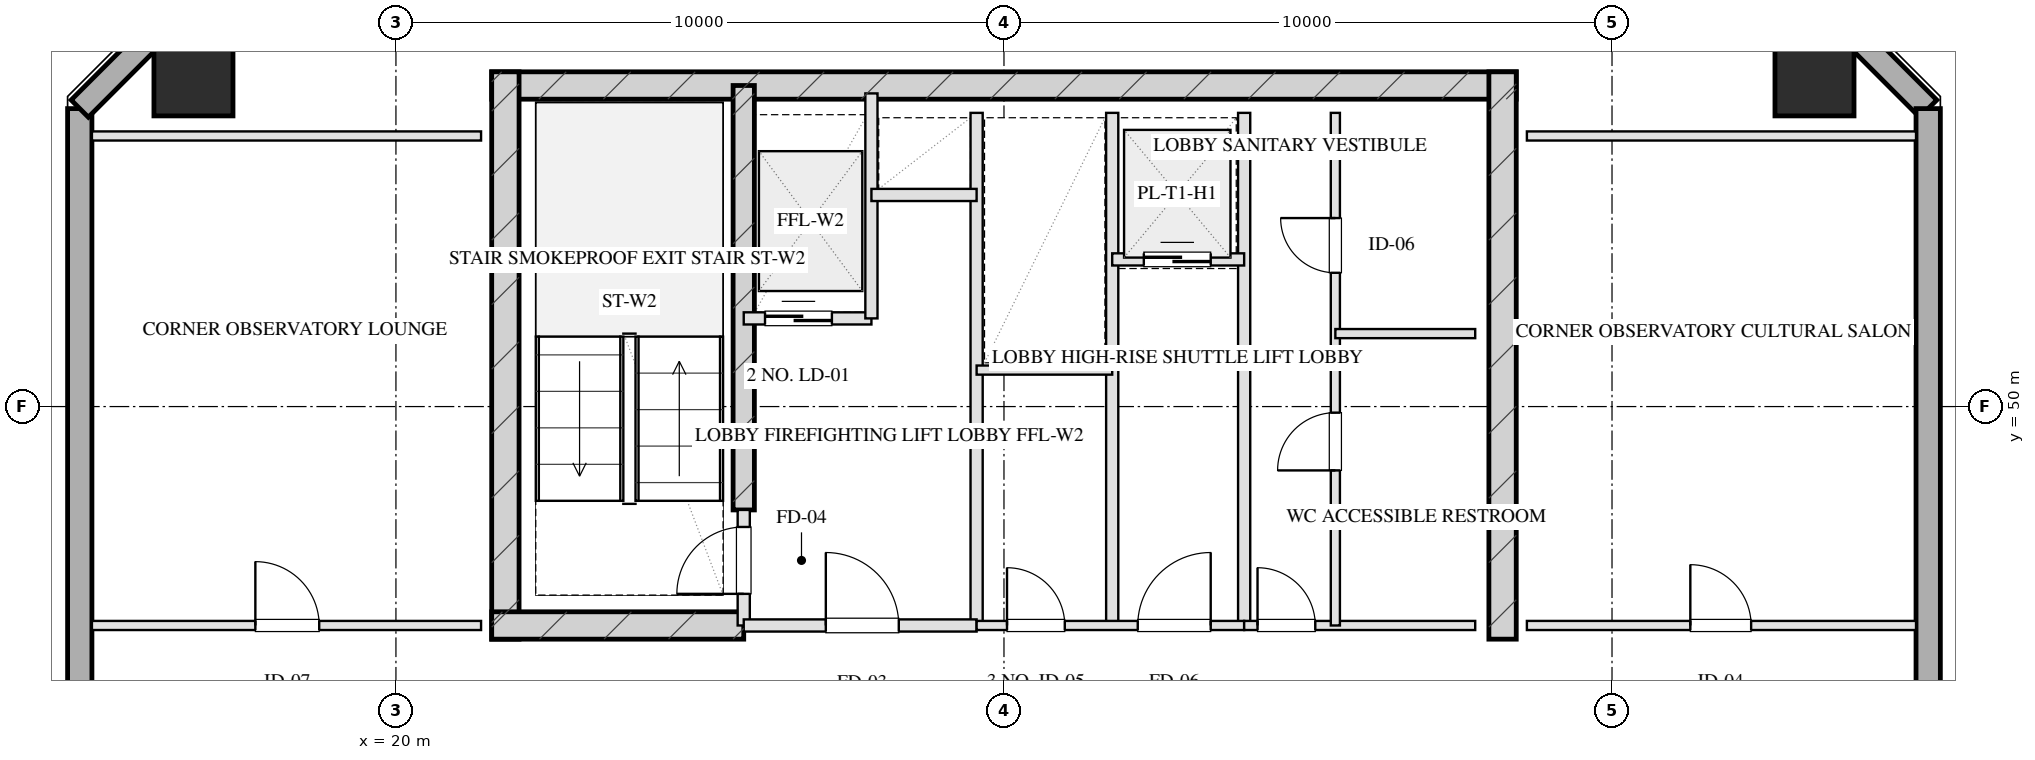
"""IFC4 building model, lengths in metres.
Left out: names, types, materials, properties, quantities, classifications, styles, units other than length and angle.
Written with IfcOpenShell. Run it as: python <this file> out.ifc"""

import sys

from ifc_helpers import new_model, si_unit, direction, frame, frame_2d, origin, origin_2d, place, context, subcontext, project, spatial, rectangle, hollow_rectangle, extrude, element, fill, save


model = new_model("IFC4")
c1 = context("Model", 3, precision=1e-05, world=origin(), true_north=direction((0.0, 1.0)))
c2 = subcontext(c1, "Body", "Model", "MODEL_VIEW")
j1 = project(units=[si_unit("LENGTHUNIT", "METRE"), si_unit("PLANEANGLEUNIT", "RADIAN")], contexts=[c1])
p1 = place(None, origin())
s1 = spatial("IfcSite", under=j1, at=p1, CompositionType="ELEMENT")
p2 = place(p1, origin())
s2 = spatial("IfcBuilding", under=s1, at=p2, CompositionType="ELEMENT")
p3 = place(p2, frame((0.0, 0.0, 266.4)))
s3 = spatial("IfcBuildingStorey", under=s2, at=p3, CompositionType="ELEMENT", Elevation=266.4)
p4 = place(p3, frame((21.575, 55.28, 0.0), z_axis=(0.0, 0.0, 1.0), x_axis=(1.0, 0.0, 0.0)))
e1 = element("IfcWall", 1, at=p4, inside=s3, PredefinedType="SHEAR", context=c2, shape_type="SweptSolid", body=[
    extrude(rectangle(XDim=16.85, YDim=0.45, at=frame_2d((8.425, 0.0))), origin(), (0.0, 0.0, 1.0), 3.2),
])
for number, where, z_axis, x_axis in (
    (2, (21.8, 46.175, 0.0), (0.0, 0.0, 1.0), (0.0, 1.0, 0.0)),
    (3, (38.2, 46.175, 0.0), (0.0, 0.0, 1.0), (0.0, 1.0, 0.0)),
):
    element("IfcWall", number, at=place(p3, frame(where, z_axis=z_axis, x_axis=x_axis)), inside=s3, PredefinedType="SHEAR", context=c2, shape_type="SweptSolid", body=[
        extrude(rectangle(XDim=9.33, YDim=0.45, at=frame_2d((4.665, 0.0))), origin(), (0.0, 0.0, 1.0), 3.2),
    ])
p5 = place(p3, frame((25.72, 48.3, 0.0), z_axis=(0.0, 0.0, 1.0), x_axis=(0.0, 1.0, 0.0)))
e4 = element("IfcWall", 4, at=p5, inside=s3, PredefinedType="SHEAR", context=c2, shape_type="SweptSolid", body=[
    extrude(rectangle(XDim=6.98, YDim=0.35, at=frame_2d((3.49, 0.0))), origin(), (0.0, 0.0, 1.0), 3.2),
])
p6 = place(p3, frame((21.575, 46.4, 0.0), z_axis=(0.0, 0.0, 1.0), x_axis=(1.0, 0.0, 0.0)))
e5 = element("IfcWall", 5, at=p6, inside=s3, PredefinedType="SHEAR", context=c2, shape_type="SweptSolid", body=[
    extrude(rectangle(XDim=4.145, YDim=0.45, at=frame_2d((2.073, 0.0))), origin(), (0.0, 0.0, 1.0), 3.2),
])
for number, where, z_axis, x_axis in (
    (6, (43.33, 55.43, 0.0), (0.0, 0.0, 1.0), (1.0, 0.0, 0.0)),
    (7, (16.67, 55.43, 0.0), (0.0, 0.0, 1.0), (1.0, 0.0, 0.0)),
):
    element("IfcColumn", number, at=place(p3, frame(where, z_axis=z_axis, x_axis=x_axis)), inside=s3, PredefinedType="COLUMN", context=c2, shape_type="SweptSolid", body=[
        extrude(hollow_rectangle(XDim=1.3, YDim=1.3, WallThickness=0.045, at=origin_2d()), origin(), (0.0, 0.0, 1.0), 3.201),
    ])
p7 = place(p3, frame((14.8, 13.1, 0.0), z_axis=(0.0, 0.0, 1.0), x_axis=(0.0, 1.0, 0.0)))
e8 = element("IfcWall", 8, at=p7, inside=s3, PredefinedType="SOLIDWALL", context=c2, shape_type="SweptSolid", body=[
    extrude(rectangle(XDim=41.8, YDim=0.4, at=frame_2d((20.9, 0.0))), origin(), (0.0, 0.0, 1.0), 2.36),
])
p8 = place(p7, frame((13.525, 0.0, 0.75)))
e9 = element("IfcOpeningElement", 9, at=p8, cuts=e8, PredefinedType="OPENING", context=c2, shape_type="SweptSolid", body=[
    extrude(rectangle(XDim=1.95, YDim=1.21, at=frame_2d((0.975, 0.605))), frame((0.0, 0.21, 0.0), z_axis=(0.0, -1.0, 0.0), x_axis=(1.0, 0.0, 0.0)), (0.0, 0.0, 1.0), 0.42),
])
p9 = place(p7, frame((17.325, 0.0, 0.75)))
e10 = element("IfcOpeningElement", 10, at=p9, cuts=e8, PredefinedType="OPENING", context=c2, shape_type="SweptSolid", body=[
    extrude(rectangle(XDim=1.95, YDim=1.21, at=frame_2d((0.975, 0.605))), frame((0.0, 0.21, 0.0), z_axis=(0.0, -1.0, 0.0), x_axis=(1.0, 0.0, 0.0)), (0.0, 0.0, 1.0), 0.42),
])
p10 = place(p7, frame((26.15, 0.0, 0.0)))
e11 = element("IfcOpeningElement", 11, at=p10, cuts=e8, PredefinedType="OPENING", context=c2, shape_type="SweptSolid", body=[
    extrude(rectangle(XDim=1.1, YDim=2.15, at=frame_2d((0.55, 1.075))), frame((0.0, 0.21, 0.0), z_axis=(0.0, -1.0, 0.0), x_axis=(1.0, 0.0, 0.0)), (0.0, 0.0, 1.0), 0.42),
])
for number, where, z_axis, x_axis in (
    (12, (14.8, 54.9, 0.0), (0.0, 0.0, 1.0), (0.707, 0.707, 0.0)),
    (13, (42.8, 57.3, 0.0), (0.0, 0.0, 1.0), (0.707, -0.707, 0.0)),
):
    element("IfcWall", number, at=place(p3, frame(where, z_axis=z_axis, x_axis=x_axis)), inside=s3, PredefinedType="SOLIDWALL", context=c2, shape_type="SweptSolid", body=[
        extrude(rectangle(XDim=3.394, YDim=0.4, at=frame_2d((1.697, 0.0))), origin(), (0.0, 0.0, 1.0), 2.36),
    ])
p11 = place(p3, frame((45.2, 54.9, 0.0), z_axis=(0.0, 0.0, 1.0), x_axis=(0.0, -1.0, 0.0)))
e14 = element("IfcWall", 14, at=p11, inside=s3, PredefinedType="SOLIDWALL", context=c2, shape_type="SweptSolid", body=[
    extrude(rectangle(XDim=41.8, YDim=0.4, at=frame_2d((20.9, 0.0))), origin(), (0.0, 0.0, 1.0), 2.36),
])
p12 = place(p11, frame((26.325, 0.0, 0.75)))
e15 = element("IfcOpeningElement", 15, at=p12, cuts=e14, PredefinedType="OPENING", context=c2, shape_type="SweptSolid", body=[
    extrude(rectangle(XDim=1.95, YDim=1.21, at=frame_2d((0.975, 0.605))), frame((0.0, 0.21, 0.0), z_axis=(0.0, -1.0, 0.0), x_axis=(1.0, 0.0, 0.0)), (0.0, 0.0, 1.0), 0.42),
])
p13 = place(p11, frame((22.525, 0.0, 0.75)))
e16 = element("IfcOpeningElement", 16, at=p13, cuts=e14, PredefinedType="OPENING", context=c2, shape_type="SweptSolid", body=[
    extrude(rectangle(XDim=1.95, YDim=1.21, at=frame_2d((0.975, 0.605))), frame((0.0, 0.21, 0.0), z_axis=(0.0, -1.0, 0.0), x_axis=(1.0, 0.0, 0.0)), (0.0, 0.0, 1.0), 0.42),
])
p14 = place(p11, frame((14.55, 0.0, 0.0)))
e17 = element("IfcOpeningElement", 17, at=p14, cuts=e14, PredefinedType="OPENING", context=c2, shape_type="SweptSolid", body=[
    extrude(rectangle(XDim=1.1, YDim=2.15, at=frame_2d((0.55, 1.075))), frame((0.0, 0.21, 0.0), z_axis=(0.0, -1.0, 0.0), x_axis=(1.0, 0.0, 0.0)), (0.0, 0.0, 1.0), 0.42),
])
p15 = place(p3, frame((25.72, 46.4, 0.0), z_axis=(0.0, 0.0, 1.0), x_axis=(0.0, 1.0, 0.0)))
e18 = element("IfcWall", 18, at=p15, inside=s3, PredefinedType="PARTITIONING", context=c2, shape_type="SweptSolid", body=[
    extrude(rectangle(XDim=1.9, YDim=0.2, at=frame_2d((0.95, 0.0))), origin(), (0.0, 0.0, 1.0), 2.925),
])
p16 = place(p15, frame((0.52, 0.0, 0.0)))
e19 = element("IfcOpeningElement", 19, at=p16, cuts=e18, PredefinedType="OPENING", context=c2, shape_type="SweptSolid", body=[
    extrude(rectangle(XDim=1.1, YDim=2.05, at=frame_2d((0.55, 1.025))), frame((0.0, 0.11, 0.0), z_axis=(0.0, -1.0, 0.0), x_axis=(1.0, 0.0, 0.0)), (0.0, 0.0, 1.0), 0.22),
])
p17 = place(p3, frame((29.55, 46.4, 0.0), z_axis=(0.0, 0.0, 1.0), x_axis=(0.0, 1.0, 0.0)))
e20 = element("IfcWall", 20, at=p17, inside=s3, PredefinedType="PARTITIONING", context=c2, shape_type="SweptSolid", body=[
    extrude(rectangle(XDim=8.43, YDim=0.2, at=frame_2d((4.215, 0.0))), origin(), (0.0, 0.0, 1.0), 2.925),
])
p18 = place(p3, frame((25.72, 46.4, 0.0), z_axis=(0.0, 0.0, 1.0), x_axis=(1.0, 0.0, 0.0)))
e21 = element("IfcWall", 21, at=p18, inside=s3, PredefinedType="PARTITIONING", context=c2, shape_type="SweptSolid", body=[
    extrude(rectangle(XDim=3.83, YDim=0.2, at=frame_2d((1.915, 0.0))), origin(), (0.0, 0.0, 1.0), 2.925),
])
p19 = place(p18, frame((1.35, 0.0, 0.0)))
e22 = element("IfcOpeningElement", 22, at=p19, cuts=e21, PredefinedType="OPENING", context=c2, shape_type="SweptSolid", body=[
    extrude(rectangle(XDim=1.2, YDim=2.05, at=frame_2d((0.6, 1.025))), frame((0.0, 0.11, 0.0), z_axis=(0.0, -1.0, 0.0), x_axis=(1.0, 0.0, 0.0)), (0.0, 0.0, 1.0), 0.22),
])
p20 = place(p3, frame((25.72, 51.45, 0.0), z_axis=(0.0, 0.0, 1.0), x_axis=(1.0, 0.0, 0.0)))
e23 = element("IfcWall", 23, at=p20, inside=s3, PredefinedType="PARTITIONING", context=c2, shape_type="SweptSolid", body=[
    extrude(rectangle(XDim=2.1, YDim=0.2, at=frame_2d((1.05, 0.0))), origin(), (0.0, 0.0, 1.0), 2.925),
])
p21 = place(p20, frame((0.35, 0.0, 0.0)))
e24 = element("IfcOpeningElement", 24, at=p21, cuts=e23, PredefinedType="OPENING", context=c2, shape_type="SweptSolid", body=[
    extrude(rectangle(XDim=1.1, YDim=2.05, at=frame_2d((0.55, 1.025))), frame((0.0, 0.11, 0.0), z_axis=(0.0, -1.0, 0.0), x_axis=(1.0, 0.0, 0.0)), (0.0, 0.0, 1.0), 0.22),
])
p22 = place(p3, frame((27.82, 51.45, 0.0), z_axis=(0.0, 0.0, 1.0), x_axis=(0.0, 1.0, 0.0)))
e25 = element("IfcWall", 25, at=p22, inside=s3, PredefinedType="PARTITIONING", context=c2, shape_type="SweptSolid", body=[
    extrude(rectangle(XDim=3.7, YDim=0.2, at=frame_2d((1.85, 0.0))), origin(), (0.0, 0.0, 1.0), 2.925),
])
p23 = place(p3, frame((27.82, 53.48, 0.0), z_axis=(0.0, 0.0, 1.0), x_axis=(1.0, 0.0, 0.0)))
e26 = element("IfcWall", 26, at=p23, inside=s3, PredefinedType="PARTITIONING", context=c2, shape_type="SweptSolid", body=[
    extrude(rectangle(XDim=1.73, YDim=0.2, at=frame_2d((0.865, 0.0))), origin(), (0.0, 0.0, 1.0), 2.925),
])
for number, where, z_axis, x_axis in (
    (27, (33.95, 46.4, 0.0), (0.0, 0.0, 1.0), (0.0, 1.0, 0.0)),
    (28, (31.78, 46.4, 0.0), (0.0, 0.0, 1.0), (0.0, 1.0, 0.0)),
):
    element("IfcWall", number, at=place(p3, frame(where, z_axis=z_axis, x_axis=x_axis)), inside=s3, PredefinedType="PARTITIONING", context=c2, shape_type="SweptSolid", body=[
        extrude(rectangle(XDim=8.43, YDim=0.2, at=frame_2d((4.215, 0.0))), origin(), (0.0, 0.0, 1.0), 2.925),
    ])
p24 = place(p3, frame((29.55, 46.4, 0.0), z_axis=(0.0, 0.0, 1.0), x_axis=(1.0, 0.0, 0.0)))
e29 = element("IfcWall", 29, at=p24, inside=s3, PredefinedType="PARTITIONING", context=c2, shape_type="SweptSolid", body=[
    extrude(rectangle(XDim=4.4, YDim=0.15, at=frame_2d((2.2, 0.0))), origin(), (0.0, 0.0, 1.0), 2.925),
])
p25 = place(p24, frame((0.5, 0.0, 0.0)))
e30 = element("IfcOpeningElement", 30, at=p25, cuts=e29, PredefinedType="OPENING", context=c2, shape_type="SweptSolid", body=[
    extrude(rectangle(XDim=0.95, YDim=2.05, at=frame_2d((0.475, 1.025))), frame((0.0, 0.085, 0.0), z_axis=(0.0, -1.0, 0.0), x_axis=(1.0, 0.0, 0.0)), (0.0, 0.0, 1.0), 0.17),
])
p26 = place(p24, frame((2.65, 0.0, 0.0)))
e31 = element("IfcOpeningElement", 31, at=p26, cuts=e29, PredefinedType="OPENING", context=c2, shape_type="SweptSolid", body=[
    extrude(rectangle(XDim=1.2, YDim=2.05, at=frame_2d((0.6, 1.025))), frame((0.0, 0.085, 0.0), z_axis=(0.0, -1.0, 0.0), x_axis=(1.0, 0.0, 0.0)), (0.0, 0.0, 1.0), 0.17),
])
p27 = place(p3, frame((29.55, 50.6, 0.0), z_axis=(0.0, 0.0, 1.0), x_axis=(1.0, 0.0, 0.0)))
e32 = element("IfcWall", 32, at=p27, inside=s3, PredefinedType="PARTITIONING", context=c2, shape_type="SweptSolid", body=[
    extrude(rectangle(XDim=2.23, YDim=0.15, at=frame_2d((1.115, 0.0))), origin(), (0.0, 0.0, 1.0), 2.925),
])
p28 = place(p3, frame((31.78, 52.42, 0.0), z_axis=(0.0, 0.0, 1.0), x_axis=(1.0, 0.0, 0.0)))
e33 = element("IfcWall", 33, at=p28, inside=s3, PredefinedType="PARTITIONING", context=c2, shape_type="SweptSolid", body=[
    extrude(rectangle(XDim=2.17, YDim=0.2, at=frame_2d((1.085, 0.0))), origin(), (0.0, 0.0, 1.0), 2.925),
])
p29 = place(p28, frame((0.52, 0.0, 0.0)))
e34 = element("IfcOpeningElement", 34, at=p29, cuts=e33, PredefinedType="OPENING", context=c2, shape_type="SweptSolid", body=[
    extrude(rectangle(XDim=1.1, YDim=2.05, at=frame_2d((0.55, 1.025))), frame((0.0, 0.11, 0.0), z_axis=(0.0, -1.0, 0.0), x_axis=(1.0, 0.0, 0.0)), (0.0, 0.0, 1.0), 0.22),
])
p30 = place(p3, frame((33.95, 46.4, 0.0), z_axis=(0.0, 0.0, 1.0), x_axis=(1.0, 0.0, 0.0)))
e35 = element("IfcWall", 35, at=p30, inside=s3, PredefinedType="PARTITIONING", context=c2, shape_type="SweptSolid", body=[
    extrude(rectangle(XDim=3.8, YDim=0.15, at=frame_2d((1.9, 0.0))), origin(), (0.0, 0.0, 1.0), 2.925),
])
p31 = place(p30, frame((0.22, 0.0, 0.0)))
e36 = element("IfcOpeningElement", 36, at=p31, cuts=e35, PredefinedType="OPENING", context=c2, shape_type="SweptSolid", body=[
    extrude(rectangle(XDim=0.95, YDim=2.05, at=frame_2d((0.475, 1.025))), frame((0.0, 0.085, 0.0), z_axis=(0.0, -1.0, 0.0), x_axis=(1.0, 0.0, 0.0)), (0.0, 0.0, 1.0), 0.17),
])
p32 = place(p3, frame((35.45, 46.4, 0.0), z_axis=(0.0, 0.0, 1.0), x_axis=(0.0, 1.0, 0.0)))
e37 = element("IfcWall", 37, at=p32, inside=s3, PredefinedType="PARTITIONING", context=c2, shape_type="SweptSolid", body=[
    extrude(rectangle(XDim=8.43, YDim=0.15, at=frame_2d((4.215, 0.0))), origin(), (0.0, 0.0, 1.0), 2.565),
])
p33 = place(p32, frame((2.55, 0.0, 0.0)))
e38 = element("IfcOpeningElement", 38, at=p33, cuts=e37, PredefinedType="OPENING", context=c2, shape_type="SweptSolid", body=[
    extrude(rectangle(XDim=0.95, YDim=2.05, at=frame_2d((0.475, 1.025))), frame((0.0, 0.085, 0.0), z_axis=(0.0, -1.0, 0.0), x_axis=(1.0, 0.0, 0.0)), (0.0, 0.0, 1.0), 0.17),
])
p34 = place(p32, frame((5.8, 0.0, 0.0)))
e39 = element("IfcOpeningElement", 39, at=p34, cuts=e37, PredefinedType="OPENING", context=c2, shape_type="SweptSolid", body=[
    extrude(rectangle(XDim=0.9, YDim=2.05, at=frame_2d((0.45, 1.025))), frame((0.0, 0.085, 0.0), z_axis=(0.0, -1.0, 0.0), x_axis=(1.0, 0.0, 0.0)), (0.0, 0.0, 1.0), 0.17),
])
p35 = place(p3, frame((35.45, 51.2, 0.0), z_axis=(0.0, 0.0, 1.0), x_axis=(1.0, 0.0, 0.0)))
e40 = element("IfcWall", 40, at=p35, inside=s3, PredefinedType="PARTITIONING", context=c2, shape_type="SweptSolid", body=[
    extrude(rectangle(XDim=2.3, YDim=0.15, at=frame_2d((1.15, 0.0))), origin(), (0.0, 0.0, 1.0), 2.925),
])
p36 = place(p3, frame((15.0, 54.45, 0.0), z_axis=(0.0, 0.0, 1.0), x_axis=(1.0, 0.0, 0.0)))
e41 = element("IfcWall", 41, at=p36, inside=s3, PredefinedType="PARTITIONING", context=c2, shape_type="SweptSolid", body=[
    extrude(rectangle(XDim=6.4, YDim=0.15, at=frame_2d((3.2, 0.0))), origin(), (0.0, 0.0, 1.0), 2.925),
])
p37 = place(p3, frame((15.0, 46.4, 0.0), z_axis=(0.0, 0.0, 1.0), x_axis=(1.0, 0.0, 0.0)))
e42 = element("IfcWall", 42, at=p37, inside=s3, PredefinedType="PARTITIONING", context=c2, shape_type="SweptSolid", body=[
    extrude(rectangle(XDim=6.4, YDim=0.15, at=frame_2d((3.2, 0.0))), origin(), (0.0, 0.0, 1.0), 2.925),
])
p38 = place(p37, frame((2.688, 0.0, 0.0)))
e43 = element("IfcOpeningElement", 43, at=p38, cuts=e42, PredefinedType="OPENING", context=c2, shape_type="SweptSolid", body=[
    extrude(rectangle(XDim=1.05, YDim=2.05, at=frame_2d((0.525, 1.025))), frame((0.0, 0.085, 0.0), z_axis=(0.0, -1.0, 0.0), x_axis=(1.0, 0.0, 0.0)), (0.0, 0.0, 1.0), 0.17),
])
p39 = place(p3, frame((38.6, 54.45, 0.0), z_axis=(0.0, 0.0, 1.0), x_axis=(1.0, 0.0, 0.0)))
e44 = element("IfcWall", 44, at=p39, inside=s3, PredefinedType="PARTITIONING", context=c2, shape_type="SweptSolid", body=[
    extrude(rectangle(XDim=6.4, YDim=0.15, at=frame_2d((3.2, 0.0))), origin(), (0.0, 0.0, 1.0), 2.925),
])
p40 = place(p3, frame((38.6, 46.4, 0.0), z_axis=(0.0, 0.0, 1.0), x_axis=(1.0, 0.0, 0.0)))
e45 = element("IfcWall", 45, at=p40, inside=s3, PredefinedType="PARTITIONING", context=c2, shape_type="SweptSolid", body=[
    extrude(rectangle(XDim=6.4, YDim=0.15, at=frame_2d((3.2, 0.0))), origin(), (0.0, 0.0, 1.0), 2.925),
])
p41 = place(p40, frame((2.688, 0.0, 0.0)))
e46 = element("IfcOpeningElement", 46, at=p41, cuts=e45, PredefinedType="OPENING", context=c2, shape_type="SweptSolid", body=[
    extrude(rectangle(XDim=1.0, YDim=2.05, at=frame_2d((0.5, 1.025))), frame((0.0, 0.085, 0.0), z_axis=(0.0, -1.0, 0.0), x_axis=(1.0, 0.0, 0.0)), (0.0, 0.0, 1.0), 0.17),
])
p42 = place(p16, origin())
e47 = element("IfcDoor", 47, at=p42, inside=s3, OperationType="SINGLE_SWING_LEFT", PredefinedType="DOOR", context=c2, shape_type="SweptSolid", body=[
    extrude(rectangle(XDim=1.1, YDim=2.05, at=frame_2d((0.55, 1.025))), frame((0.0, 0.025, 0.0), z_axis=(0.0, -1.0, 0.0), x_axis=(1.0, 0.0, 0.0)), (0.0, 0.0, 1.0), 0.05),
])
fill(e19, e47)
p43 = place(p19, origin())
e48 = element("IfcDoor", 48, at=p43, inside=s3, OperationType="SINGLE_SWING_LEFT", PredefinedType="DOOR", context=c2, shape_type="SweptSolid", body=[
    extrude(rectangle(XDim=1.2, YDim=2.05, at=frame_2d((0.6, 1.025))), frame((0.0, 0.025, 0.0), z_axis=(0.0, -1.0, 0.0), x_axis=(1.0, 0.0, 0.0)), (0.0, 0.0, 1.0), 0.05),
])
fill(e22, e48)
p44 = place(p21, origin())
e49 = element("IfcDoor", 49, at=p44, inside=s3, OperationType="DOUBLE_DOOR_SLIDING", PredefinedType="DOOR", context=c2, shape_type="SweptSolid", body=[
    extrude(rectangle(XDim=1.1, YDim=2.05, at=frame_2d((0.55, 1.025))), frame((0.0, 0.025, 0.0), z_axis=(0.0, -1.0, 0.0), x_axis=(1.0, 0.0, 0.0)), (0.0, 0.0, 1.0), 0.05),
])
fill(e24, e49)
p45 = place(p25, origin())
e50 = element("IfcDoor", 50, at=p45, inside=s3, OperationType="SINGLE_SWING_LEFT", PredefinedType="DOOR", context=c2, shape_type="SweptSolid", body=[
    extrude(rectangle(XDim=0.95, YDim=2.05, at=frame_2d((0.475, 1.025))), frame((0.0, 0.025, 0.0), z_axis=(0.0, -1.0, 0.0), x_axis=(1.0, 0.0, 0.0)), (0.0, 0.0, 1.0), 0.05),
])
fill(e30, e50)
p46 = place(p26, origin())
e51 = element("IfcDoor", 51, at=p46, inside=s3, OperationType="SINGLE_SWING_RIGHT", PredefinedType="DOOR", context=c2, shape_type="SweptSolid", body=[
    extrude(rectangle(XDim=1.2, YDim=2.05, at=frame_2d((0.6, 1.025))), frame((0.0, 0.025, 0.0), z_axis=(0.0, -1.0, 0.0), x_axis=(1.0, 0.0, 0.0)), (0.0, 0.0, 1.0), 0.05),
])
fill(e31, e51)
p47 = place(p29, origin())
e52 = element("IfcDoor", 52, at=p47, inside=s3, OperationType="DOUBLE_DOOR_SLIDING", PredefinedType="DOOR", context=c2, shape_type="SweptSolid", body=[
    extrude(rectangle(XDim=1.1, YDim=2.05, at=frame_2d((0.55, 1.025))), frame((0.0, 0.025, 0.0), z_axis=(0.0, -1.0, 0.0), x_axis=(1.0, 0.0, 0.0)), (0.0, 0.0, 1.0), 0.05),
])
fill(e34, e52)
p48 = place(p31, origin())
e53 = element("IfcDoor", 53, at=p48, inside=s3, OperationType="SINGLE_SWING_LEFT", PredefinedType="DOOR", context=c2, shape_type="SweptSolid", body=[
    extrude(rectangle(XDim=0.95, YDim=2.05, at=frame_2d((0.475, 1.025))), frame((0.0, 0.025, 0.0), z_axis=(0.0, -1.0, 0.0), x_axis=(1.0, 0.0, 0.0)), (0.0, 0.0, 1.0), 0.05),
])
fill(e36, e53)
p49 = place(p33, origin())
e54 = element("IfcDoor", 54, at=p49, inside=s3, OperationType="SINGLE_SWING_LEFT", PredefinedType="DOOR", context=c2, shape_type="SweptSolid", body=[
    extrude(rectangle(XDim=0.95, YDim=2.05, at=frame_2d((0.475, 1.025))), frame((0.0, 0.025, 0.0), z_axis=(0.0, -1.0, 0.0), x_axis=(1.0, 0.0, 0.0)), (0.0, 0.0, 1.0), 0.05),
])
fill(e38, e54)
p50 = place(p34, origin())
e55 = element("IfcDoor", 55, at=p50, inside=s3, OperationType="SINGLE_SWING_RIGHT", PredefinedType="DOOR", context=c2, shape_type="SweptSolid", body=[
    extrude(rectangle(XDim=0.9, YDim=2.05, at=frame_2d((0.45, 1.025))), frame((0.0, 0.025, 0.0), z_axis=(0.0, -1.0, 0.0), x_axis=(1.0, 0.0, 0.0)), (0.0, 0.0, 1.0), 0.05),
])
fill(e39, e55)
p51 = place(p38, origin())
e56 = element("IfcDoor", 56, at=p51, inside=s3, OperationType="SINGLE_SWING_LEFT", PredefinedType="DOOR", context=c2, shape_type="SweptSolid", body=[
    extrude(rectangle(XDim=1.05, YDim=2.05, at=frame_2d((0.525, 1.025))), frame((0.0, 0.025, 0.0), z_axis=(0.0, -1.0, 0.0), x_axis=(1.0, 0.0, 0.0)), (0.0, 0.0, 1.0), 0.05),
])
fill(e43, e56)
p52 = place(p41, origin())
e57 = element("IfcDoor", 57, at=p52, inside=s3, OperationType="SINGLE_SWING_LEFT", PredefinedType="DOOR", context=c2, shape_type="SweptSolid", body=[
    extrude(rectangle(XDim=1.0, YDim=2.05, at=frame_2d((0.5, 1.025))), frame((0.0, 0.025, 0.0), z_axis=(0.0, -1.0, 0.0), x_axis=(1.0, 0.0, 0.0)), (0.0, 0.0, 1.0), 0.05),
])
fill(e46, e57)
save(model, sys.argv[1])
